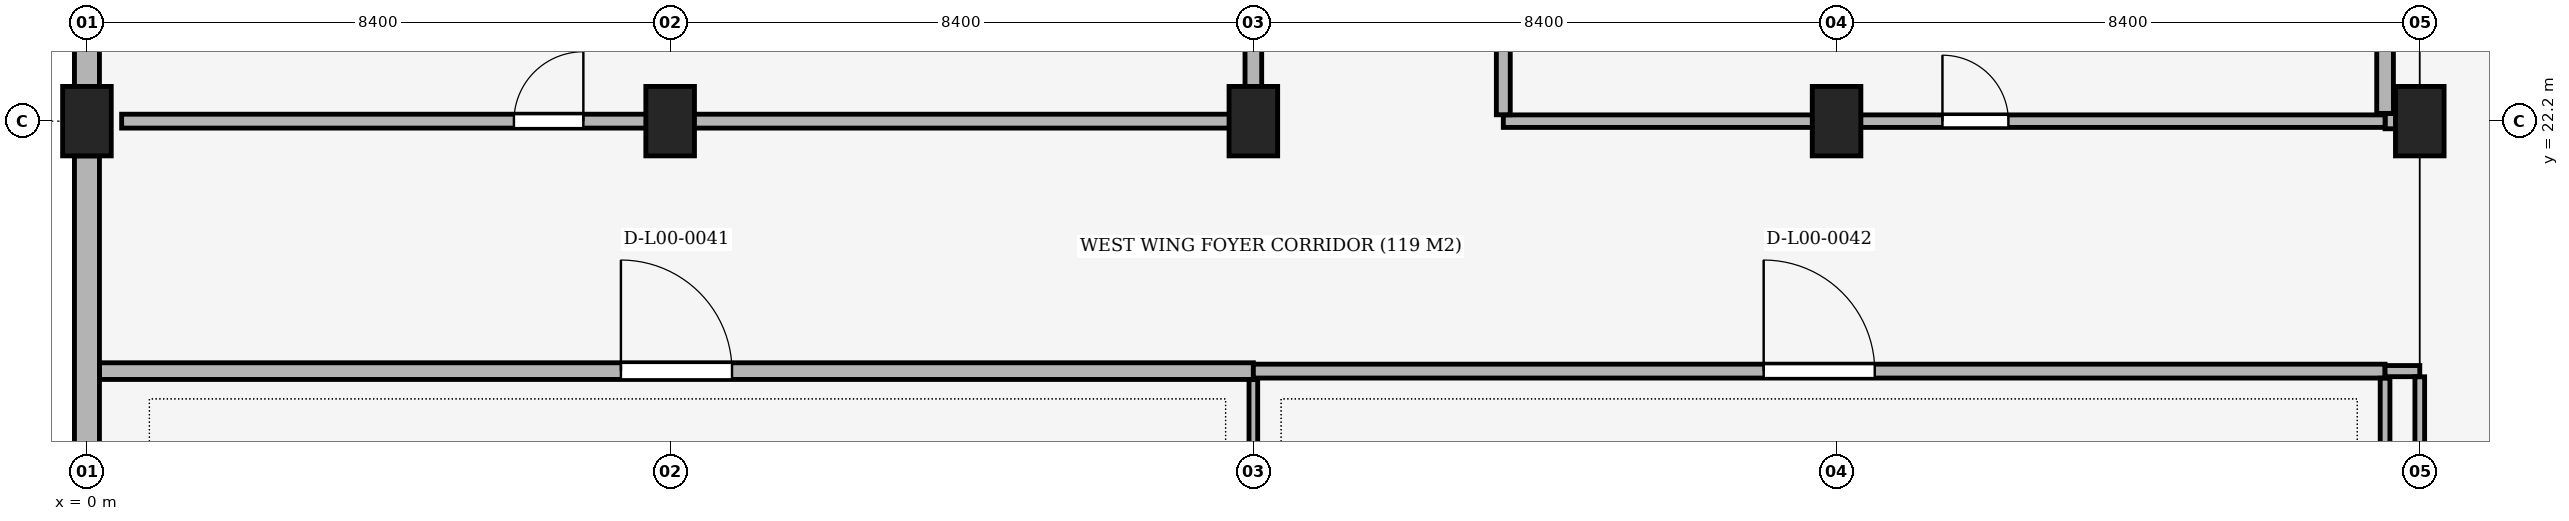
"""IFC4 building model, lengths in metres.
Left out: names, types, materials, properties, quantities, classifications, styles, units other than length and angle.
Written with IfcOpenShell. Run it as: python <this file> out.ifc"""

import sys

from ifc_helpers import new_model, si_unit, direction, frame, frame_2d, origin, origin_2d, place, context, subcontext, project, spatial, rectangle, extrude, element, fill, save


model = new_model("IFC4")
c1 = context("Model", 3, precision=1e-05, world=origin(), true_north=direction((0.0, 1.0)))
c2 = subcontext(c1, "Body", "Model", "MODEL_VIEW")
j1 = project(units=[si_unit("LENGTHUNIT", "METRE"), si_unit("PLANEANGLEUNIT", "RADIAN")], contexts=[c1])
p1 = place(None, origin())
s1 = spatial("IfcSite", under=j1, at=p1, CompositionType="ELEMENT")
p2 = place(p1, origin())
s2 = spatial("IfcBuilding", under=s1, at=p2, CompositionType="ELEMENT")
p3 = place(p2, origin())
s3 = spatial("IfcBuildingStorey", under=s2, at=p3, CompositionType="ELEMENT", Elevation=0.0)
for number, where, z_axis, x_axis in (
    (1, (0.0, 22.2, 0.0), (0.0, 0.0, 1.0), (1.0, 0.0, 0.0)),
    (2, (8.4, 22.2, 0.0), (0.0, 0.0, 1.0), (1.0, 0.0, 0.0)),
    (3, (16.8, 22.2, 0.0), (0.0, 0.0, 1.0), (1.0, 0.0, 0.0)),
    (4, (25.2, 22.2, 0.0), (0.0, 0.0, 1.0), (1.0, 0.0, 0.0)),
    (5, (33.6, 22.2, 0.0), (0.0, 0.0, 1.0), (1.0, 0.0, 0.0)),
):
    element("IfcColumn", number, at=place(p3, frame(where, z_axis=z_axis, x_axis=x_axis)), inside=s3, PredefinedType="COLUMN", context=c2, shape_type="SweptSolid", body=[
        extrude(rectangle(XDim=0.7, YDim=1.0, at=origin_2d()), origin(), (0.0, 0.0, 1.0), 5.1),
    ])
p4 = place(p3, frame((0.0, 5.9, 0.0), z_axis=(0.0, 0.0, 1.0), x_axis=(0.0, 1.0, 0.0)))
e6 = element("IfcWall", 6, at=p4, inside=s3, PredefinedType="SOLIDWALL", context=c2, shape_type="SweptSolid", body=[
    extrude(rectangle(XDim=15.8, YDim=0.36, at=frame_2d((7.9, 0.0))), origin(), (0.0, 0.0, 1.0), 3.67),
])
p5 = place(p4, frame((6.7, 0.0, 0.0)))
e7 = element("IfcOpeningElement", 7, at=p5, cuts=e6, PredefinedType="OPENING", context=c2, shape_type="SweptSolid", body=[
    extrude(rectangle(XDim=2.4, YDim=2.6, at=frame_2d((1.2, 1.3))), frame((0.0, 0.195, 0.0), z_axis=(0.0, -1.0, 0.0), x_axis=(1.0, 0.0, 0.0)), (0.0, 0.0, 1.0), 0.39),
])
p6 = place(p3, frame((0.0, 22.7, 0.0), z_axis=(0.0, 0.0, 1.0), x_axis=(0.0, 1.0, 0.0)))
e8 = element("IfcWall", 8, at=p6, inside=s3, PredefinedType="SOLIDWALL", context=c2, shape_type="SweptSolid", body=[
    extrude(rectangle(XDim=3.8, YDim=0.36, at=frame_2d((1.9, 0.0))), origin(), (0.0, 0.0, 1.0), 4.17),
])
p7 = place(p6, frame((1.0, 0.0, 0.85)))
e9 = element("IfcOpeningElement", 9, at=p7, cuts=e8, PredefinedType="OPENING", context=c2, shape_type="SweptSolid", body=[
    extrude(rectangle(XDim=1.8, YDim=2.4, at=frame_2d((0.9, 1.2))), frame((0.0, 0.195, 0.0), z_axis=(0.0, -1.0, 0.0), x_axis=(1.0, 0.0, 0.0)), (0.0, 0.0, 1.0), 0.39),
])
p8 = place(p3, frame((0.182, 18.6, 0.0), z_axis=(0.0, 0.0, 1.0), x_axis=(1.0, 0.0, 0.0)))
e10 = element("IfcWall", 10, at=p8, inside=s3, PredefinedType="PARTITIONING", context=c2, shape_type="SweptSolid", body=[
    extrude(rectangle(XDim=16.618, YDim=0.24, at=frame_2d((8.309, 0.0))), origin(), (0.0, 0.0, 1.0), 3.67),
])
p9 = place(p8, frame((7.509, 0.0, 0.0)))
e11 = element("IfcOpeningElement", 11, at=p9, cuts=e10, PredefinedType="OPENING", context=c2, shape_type="SweptSolid", body=[
    extrude(rectangle(XDim=1.6, YDim=2.3, at=frame_2d((0.8, 1.15))), frame((0.0, 0.135, 0.0), z_axis=(0.0, -1.0, 0.0), x_axis=(1.0, 0.0, 0.0)), (0.0, 0.0, 1.0), 0.27),
])
p10 = place(p3, frame((16.8, 18.6, 0.0), z_axis=(0.0, 0.0, 1.0), x_axis=(1.0, 0.0, 0.0)))
e12 = element("IfcWall", 12, at=p10, inside=s3, PredefinedType="PARTITIONING", context=c2, shape_type="SweptSolid", body=[
    extrude(rectangle(XDim=16.3, YDim=0.2, at=frame_2d((8.15, 0.0))), origin(), (0.0, 0.0, 1.0), 3.67),
])
p11 = place(p10, frame((7.35, 0.0, 0.0)))
e13 = element("IfcOpeningElement", 13, at=p11, cuts=e12, PredefinedType="OPENING", context=c2, shape_type="SweptSolid", body=[
    extrude(rectangle(XDim=1.6, YDim=2.3, at=frame_2d((0.8, 1.15))), frame((0.0, 0.115, 0.0), z_axis=(0.0, -1.0, 0.0), x_axis=(1.0, 0.0, 0.0)), (0.0, 0.0, 1.0), 0.23),
])
p12 = place(p3, frame((33.1, 18.6, 0.0), z_axis=(0.0, 0.0, 1.0), x_axis=(1.0, 0.0, 0.0)))
e14 = element("IfcWall", 14, at=p12, inside=s3, PredefinedType="PARTITIONING", context=c2, shape_type="SweptSolid", body=[
    extrude(rectangle(XDim=0.5, YDim=0.16, at=frame_2d((0.25, 0.0))), origin(), (0.0, 0.0, 1.0), 3.67),
])
p13 = place(p3, frame((33.1, 22.2, 0.0), z_axis=(0.0, 0.0, 1.0), x_axis=(1.0, 0.0, 0.0)))
e15 = element("IfcWall", 15, at=p13, inside=s3, PredefinedType="PARTITIONING", context=c2, shape_type="SweptSolid", body=[
    extrude(rectangle(XDim=0.5, YDim=0.22, at=frame_2d((0.25, 0.0))), origin(), (0.0, 0.0, 1.0), 4.07),
])
p14 = place(p3, frame((0.5, 22.2, 0.0), z_axis=(0.0, 0.0, 1.0), x_axis=(1.0, 0.0, 0.0)))
e16 = element("IfcWall", 16, at=p14, inside=s3, PredefinedType="PARTITIONING", context=c2, shape_type="SweptSolid", body=[
    extrude(rectangle(XDim=16.3, YDim=0.2, at=frame_2d((8.15, 0.0))), origin(), (0.0, 0.0, 1.0), 4.07),
])
p15 = place(p14, frame((5.65, 0.0, 0.0)))
e17 = element("IfcOpeningElement", 17, at=p15, cuts=e16, PredefinedType="OPENING", context=c2, shape_type="SweptSolid", body=[
    extrude(rectangle(XDim=1.0, YDim=2.2, at=frame_2d((0.5, 1.1))), frame((0.0, 0.115, 0.0), z_axis=(0.0, -1.0, 0.0), x_axis=(1.0, 0.0, 0.0)), (0.0, 0.0, 1.0), 0.23),
])
p16 = place(p3, frame((20.4, 22.2, 0.0), z_axis=(0.0, 0.0, 1.0), x_axis=(1.0, 0.0, 0.0)))
e18 = element("IfcWall", 18, at=p16, inside=s3, PredefinedType="PARTITIONING", context=c2, shape_type="SweptSolid", body=[
    extrude(rectangle(XDim=12.7, YDim=0.18, at=frame_2d((6.35, 0.0))), origin(), (0.0, 0.0, 1.0), 4.07),
])
p17 = place(p16, frame((6.325, 0.0, 0.0)))
e19 = element("IfcOpeningElement", 19, at=p17, cuts=e18, PredefinedType="OPENING", context=c2, shape_type="SweptSolid", body=[
    extrude(rectangle(XDim=0.95, YDim=2.1, at=frame_2d((0.475, 1.05))), frame((0.0, 0.105, 0.0), z_axis=(0.0, -1.0, 0.0), x_axis=(1.0, 0.0, 0.0)), (0.0, 0.0, 1.0), 0.21),
])
p18 = place(p3, frame((16.8, 0.065, 0.0), z_axis=(0.0, 0.0, 1.0), x_axis=(0.0, 1.0, 0.0)))
e20 = element("IfcWall", 20, at=p18, inside=s3, PredefinedType="PARTITIONING", context=c2, shape_type="SweptSolid", body=[
    extrude(rectangle(XDim=18.413, YDim=0.125, at=frame_2d((9.207, 0.0))), origin(), (0.0, 0.0, 1.0), 3.67),
])
p19 = place(p3, frame((16.8, 22.302, 0.0), z_axis=(0.0, 0.0, 1.0), x_axis=(0.0, 1.0, 0.0)))
e21 = element("IfcWall", 21, at=p19, inside=s3, PredefinedType="PARTITIONING", context=c2, shape_type="SweptSolid", body=[
    extrude(rectangle(XDim=12.698, YDim=0.24, at=frame_2d((6.349, 0.0))), origin(), (0.0, 0.0, 1.0), 4.02),
])
p20 = place(p3, frame((20.4, 22.292, 0.0), z_axis=(0.0, 0.0, 1.0), x_axis=(0.0, 1.0, 0.0)))
e22 = element("IfcWall", 22, at=p20, inside=s3, PredefinedType="PARTITIONING", context=c2, shape_type="SweptSolid", body=[
    extrude(rectangle(XDim=12.596, YDim=0.2, at=frame_2d((6.298, 0.0))), origin(), (0.0, 0.0, 1.0), 4.07),
])
p21 = place(p3, frame((33.1, 0.182, 0.0), z_axis=(0.0, 0.0, 1.0), x_axis=(0.0, 1.0, 0.0)))
e23 = element("IfcWall", 23, at=p21, inside=s3, PredefinedType="PARTITIONING", context=c2, shape_type="SweptSolid", body=[
    extrude(rectangle(XDim=18.316, YDim=0.14, at=frame_2d((9.158, 0.0))), origin(), (0.0, 0.0, 1.0), 4.07),
])
p22 = place(p3, frame((33.1, 22.312, 0.0), z_axis=(0.0, 0.0, 1.0), x_axis=(0.0, 1.0, 0.0)))
e24 = element("IfcWall", 24, at=p22, inside=s3, PredefinedType="PARTITIONING", context=c2, shape_type="SweptSolid", body=[
    extrude(rectangle(XDim=12.576, YDim=0.24, at=frame_2d((6.288, 0.0))), origin(), (0.0, 0.0, 1.0), 4.07),
])
p23 = place(p3, frame((33.6, -0.028, 0.0), z_axis=(0.0, 0.0, 1.0), x_axis=(0.0, 1.0, 0.0)))
e25 = element("IfcWall", 25, at=p23, inside=s3, PredefinedType="PARTITIONING", context=c2, shape_type="SweptSolid", body=[
    extrude(rectangle(XDim=18.546, YDim=0.14, at=frame_2d((9.273, 0.0))), origin(), (0.0, 0.0, 1.0), 3.67),
])
p24 = place(p9, origin())
e26 = element("IfcDoor", 26, at=p24, inside=s3, OperationType="SINGLE_SWING_LEFT", PredefinedType="DOOR", context=c2, shape_type="SweptSolid", body=[
    extrude(rectangle(XDim=1.6, YDim=2.3, at=frame_2d((0.8, 1.15))), frame((0.0, 0.025, 0.0), z_axis=(0.0, -1.0, 0.0), x_axis=(1.0, 0.0, 0.0)), (0.0, 0.0, 1.0), 0.05),
])
fill(e11, e26)
p25 = place(p11, origin())
e27 = element("IfcDoor", 27, at=p25, inside=s3, OperationType="SINGLE_SWING_LEFT", PredefinedType="DOOR", context=c2, shape_type="SweptSolid", body=[
    extrude(rectangle(XDim=1.6, YDim=2.3, at=frame_2d((0.8, 1.15))), frame((0.0, 0.025, 0.0), z_axis=(0.0, -1.0, 0.0), x_axis=(1.0, 0.0, 0.0)), (0.0, 0.0, 1.0), 0.05),
])
fill(e13, e27)
p26 = place(p15, origin())
e28 = element("IfcDoor", 28, at=p26, inside=s3, OperationType="SINGLE_SWING_RIGHT", PredefinedType="DOOR", context=c2, shape_type="SweptSolid", body=[
    extrude(rectangle(XDim=1.0, YDim=2.2, at=frame_2d((0.5, 1.1))), frame((0.0, 0.025, 0.0), z_axis=(0.0, -1.0, 0.0), x_axis=(1.0, 0.0, 0.0)), (0.0, 0.0, 1.0), 0.05),
])
fill(e17, e28)
p27 = place(p17, origin())
e29 = element("IfcDoor", 29, at=p27, inside=s3, OperationType="SINGLE_SWING_LEFT", PredefinedType="DOOR", context=c2, shape_type="SweptSolid", body=[
    extrude(rectangle(XDim=0.95, YDim=2.1, at=frame_2d((0.475, 1.05))), frame((0.0, 0.025, 0.0), z_axis=(0.0, -1.0, 0.0), x_axis=(1.0, 0.0, 0.0)), (0.0, 0.0, 1.0), 0.05),
])
fill(e19, e29)
save(model, sys.argv[1])
